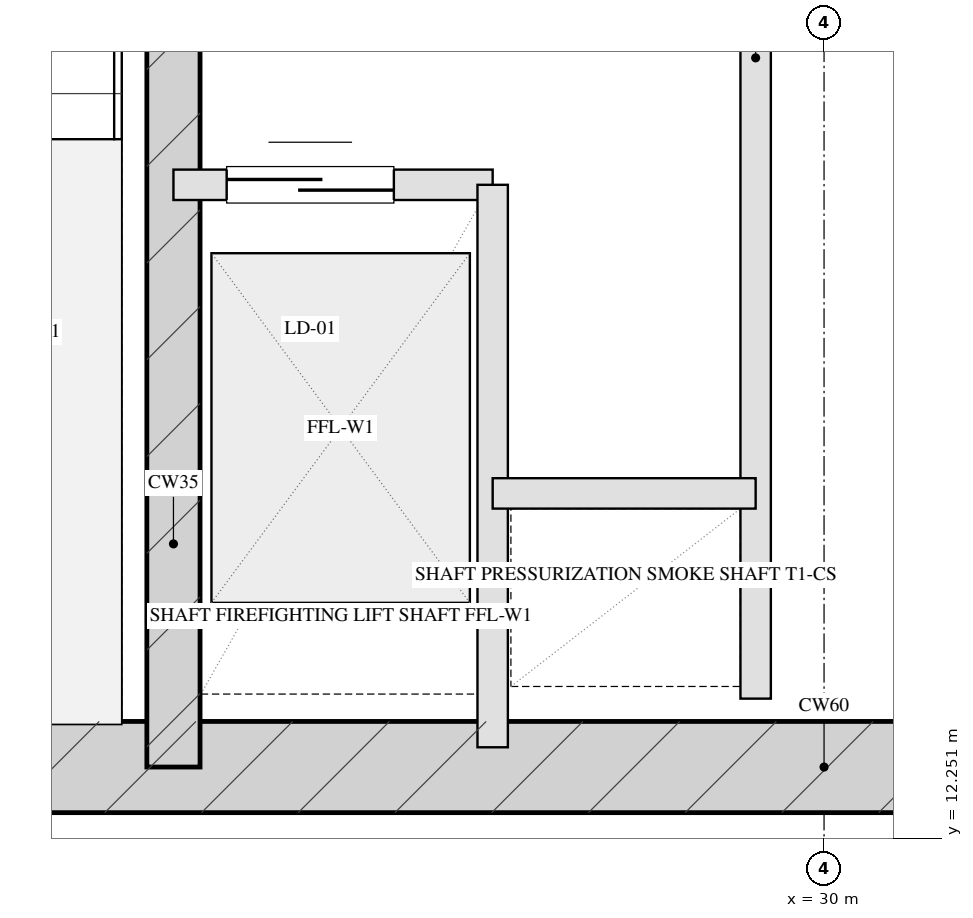
"""IFC4 building model, lengths in metres.
Left out: names, types, materials, properties, quantities, classifications, styles, units other than length and angle.
Written with IfcOpenShell. Run it as: python <this file> out.ifc"""

import sys

from ifc_helpers import new_model, si_unit, direction, frame, frame_2d, origin, place, context, subcontext, project, spatial, rectangle, extrude, element, fill, save


model = new_model("IFC4")
c1 = context("Model", 3, precision=1e-05, world=origin(), true_north=direction((0.0, 1.0)))
c2 = subcontext(c1, "Body", "Model", "MODEL_VIEW")
j1 = project(units=[si_unit("LENGTHUNIT", "METRE"), si_unit("PLANEANGLEUNIT", "RADIAN")], contexts=[c1])
p1 = place(None, origin())
s1 = spatial("IfcSite", under=j1, at=p1, CompositionType="ELEMENT")
p2 = place(p1, origin())
s2 = spatial("IfcBuilding", under=s1, at=p2, CompositionType="ELEMENT")
p3 = place(p2, frame((0.0, 0.0, 96.6)))
s3 = spatial("IfcBuildingStorey", under=s2, at=p3, CompositionType="ELEMENT", Elevation=96.6)
p4 = place(p3, frame((21.5, 12.72, 0.0), z_axis=(0.0, 0.0, 1.0), x_axis=(1.0, 0.0, 0.0)))
e1 = element("IfcWall", 1, at=p4, inside=s3, PredefinedType="SHEAR", context=c2, shape_type="SweptSolid", body=[
    extrude(rectangle(XDim=17.0, YDim=0.6, at=frame_2d((8.5, 0.0))), origin(), (0.0, 0.0, 1.0), 3.45),
])
p5 = place(p3, frame((25.72, 19.7, 0.0), z_axis=(0.0, 0.0, 1.0), x_axis=(0.0, -1.0, 0.0)))
e2 = element("IfcWall", 2, at=p5, inside=s3, PredefinedType="SHEAR", context=c2, shape_type="SweptSolid", body=[
    extrude(rectangle(XDim=6.98, YDim=0.35, at=frame_2d((3.49, 0.0))), origin(), (0.0, 0.0, 1.0), 3.45),
])
p6 = place(p3, frame((29.55, 21.6, 0.0), z_axis=(0.0, 0.0, 1.0), x_axis=(0.0, -1.0, 0.0)))
e3 = element("IfcWall", 3, at=p6, inside=s3, PredefinedType="PARTITIONING", context=c2, shape_type="SweptSolid", body=[
    extrude(rectangle(XDim=8.43, YDim=0.2, at=frame_2d((4.215, 0.0))), origin(), (0.0, 0.0, 1.0), 3.155),
])
p7 = place(p3, frame((25.72, 16.55, 0.0), z_axis=(0.0, 0.0, 1.0), x_axis=(1.0, 0.0, 0.0)))
e4 = element("IfcWall", 4, at=p7, inside=s3, PredefinedType="PARTITIONING", context=c2, shape_type="SweptSolid", body=[
    extrude(rectangle(XDim=2.1, YDim=0.2, at=frame_2d((1.05, 0.0))), origin(), (0.0, 0.0, 1.0), 3.155),
])
p8 = place(p7, frame((0.35, 0.0, 0.0)))
e5 = element("IfcOpeningElement", 5, at=p8, cuts=e4, PredefinedType="OPENING", context=c2, shape_type="SweptSolid", body=[
    extrude(rectangle(XDim=1.1, YDim=2.05, at=frame_2d((0.55, 1.025))), frame((0.0, 0.11, 0.0), z_axis=(0.0, -1.0, 0.0), x_axis=(1.0, 0.0, 0.0)), (0.0, 0.0, 1.0), 0.22),
])
p9 = place(p3, frame((27.82, 16.55, 0.0), z_axis=(0.0, 0.0, 1.0), x_axis=(0.0, -1.0, 0.0)))
e6 = element("IfcWall", 6, at=p9, inside=s3, PredefinedType="PARTITIONING", context=c2, shape_type="SweptSolid", body=[
    extrude(rectangle(XDim=3.7, YDim=0.2, at=frame_2d((1.85, 0.0))), origin(), (0.0, 0.0, 1.0), 3.155),
])
p10 = place(p3, frame((27.82, 14.52, 0.0), z_axis=(0.0, 0.0, 1.0), x_axis=(1.0, 0.0, 0.0)))
e7 = element("IfcWall", 7, at=p10, inside=s3, PredefinedType="PARTITIONING", context=c2, shape_type="SweptSolid", body=[
    extrude(rectangle(XDim=1.73, YDim=0.2, at=frame_2d((0.865, 0.0))), origin(), (0.0, 0.0, 1.0), 3.155),
])
p11 = place(p8, origin())
e8 = element("IfcDoor", 8, at=p11, inside=s3, OperationType="DOUBLE_DOOR_SLIDING", PredefinedType="DOOR", context=c2, shape_type="SweptSolid", body=[
    extrude(rectangle(XDim=1.1, YDim=2.05, at=frame_2d((0.55, 1.025))), frame((0.0, 0.025, 0.0), z_axis=(0.0, -1.0, 0.0), x_axis=(1.0, 0.0, 0.0)), (0.0, 0.0, 1.0), 0.05),
])
fill(e5, e8)
save(model, sys.argv[1])
